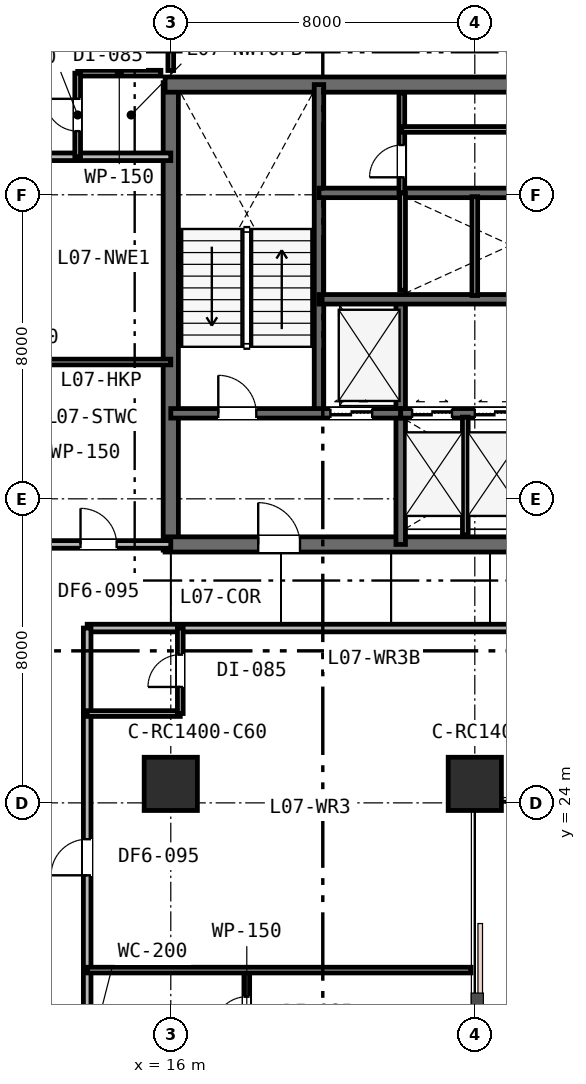
"""IFC4 building model, lengths in metres.
Left out: names, types, materials, properties, quantities, classifications, styles, units other than length and angle.
Written with IfcOpenShell. Run it as: python <this file> out.ifc"""

import sys

from ifc_helpers import new_model, si_unit, direction, frame, frame_2d, origin, origin_2d, place, context, subcontext, project, spatial, rectangle, extrude, element, fill, save


model = new_model("IFC4")
c1 = context("Model", 3, precision=1e-05, world=origin(), true_north=direction((0.0, 1.0)))
c2 = subcontext(c1, "Body", "Model", "MODEL_VIEW")
j1 = project(units=[si_unit("LENGTHUNIT", "METRE"), si_unit("PLANEANGLEUNIT", "RADIAN")], contexts=[c1])
p1 = place(None, origin())
s1 = spatial("IfcSite", under=j1, at=p1, CompositionType="ELEMENT")
p2 = place(p1, origin())
s2 = spatial("IfcBuilding", under=s1, at=p2, CompositionType="ELEMENT")
p3 = place(p2, frame((0.0, 0.0, 33.0)))
s3 = spatial("IfcBuildingStorey", under=s2, at=p3, CompositionType="ELEMENT", Elevation=33.0)
p4 = place(p3, frame((16.0, 30.65, 0.0), z_axis=(0.0, 0.0, 1.0), x_axis=(0.0, 1.0, 0.0)))
e1 = element("IfcWall", 1, at=p4, inside=s3, PredefinedType="SHEAR", context=c2, shape_type="SweptSolid", body=[
    extrude(rectangle(XDim=12.3, YDim=0.4, at=frame_2d((6.15, 0.0))), origin(), (0.0, 0.0, 1.0), 3.6),
])
p5 = place(p3, frame((15.85, 42.9, 0.0), z_axis=(0.0, 0.0, 1.0), x_axis=(1.0, 0.0, 0.0)))
e2 = element("IfcWall", 2, at=p5, inside=s3, PredefinedType="SHEAR", context=c2, shape_type="SweptSolid", body=[
    extrude(rectangle(XDim=24.3, YDim=0.4, at=frame_2d((12.15, 0.0))), origin(), (0.0, 0.0, 1.0), 3.6),
])
p6 = place(p3, frame((15.85, 30.8, 0.0), z_axis=(0.0, 0.0, 1.0), x_axis=(1.0, 0.0, 0.0)))
e3 = element("IfcWall", 3, at=p6, inside=s3, PredefinedType="SHEAR", context=c2, shape_type="SweptSolid", body=[
    extrude(rectangle(XDim=11.2, YDim=0.4, at=frame_2d((5.6, 0.0))), origin(), (0.0, 0.0, 1.0), 3.6),
])
p7 = place(p6, frame((2.45, 0.0, 0.0)))
e4 = element("IfcOpeningElement", 4, at=p7, cuts=e3, PredefinedType="OPENING", context=c2, shape_type="SweptSolid", body=[
    extrude(rectangle(XDim=1.1, YDim=2.15, at=frame_2d((0.55, 1.075))), frame((0.0, 0.21, 0.0), z_axis=(0.0, -1.0, 0.0), x_axis=(1.0, 0.0, 0.0)), (0.0, 0.0, 1.0), 0.42),
])
p8 = place(p3, frame((19.9, 34.25, 0.0), z_axis=(0.0, 0.0, 1.0), x_axis=(0.0, 1.0, 0.0)))
e5 = element("IfcWall", 5, at=p8, inside=s3, PredefinedType="SHEAR", context=c2, shape_type="SweptSolid", body=[
    extrude(rectangle(XDim=8.65, YDim=0.25, at=frame_2d((4.325, 0.0))), origin(), (0.0, 0.0, 1.0), 3.6),
])
p9 = place(p3, frame((22.05, 30.8, 0.0), z_axis=(0.0, 0.0, 1.0), x_axis=(0.0, 1.0, 0.0)))
e6 = element("IfcWall", 6, at=p9, inside=s3, PredefinedType="SHEAR", context=c2, shape_type="SweptSolid", body=[
    extrude(rectangle(XDim=6.45, YDim=0.25, at=frame_2d((3.225, 0.0))), origin(), (0.0, 0.0, 1.0), 3.6),
])
p10 = place(p3, frame((16.0, 34.25, 0.0), z_axis=(0.0, 0.0, 1.0), x_axis=(1.0, 0.0, 0.0)))
e7 = element("IfcWall", 7, at=p10, inside=s3, PredefinedType="SHEAR", context=c2, shape_type="SweptSolid", body=[
    extrude(rectangle(XDim=6.05, YDim=0.25, at=frame_2d((3.025, 0.0))), origin(), (0.0, 0.0, 1.0), 3.6),
])
p11 = place(p10, frame((1.25, 0.0, 0.0)))
e8 = element("IfcOpeningElement", 8, at=p11, cuts=e7, PredefinedType="OPENING", context=c2, shape_type="SweptSolid", body=[
    extrude(rectangle(XDim=1.0, YDim=2.15, at=frame_2d((0.5, 1.075))), frame((0.0, 0.135, 0.0), z_axis=(0.0, -1.0, 0.0), x_axis=(1.0, 0.0, 0.0)), (0.0, 0.0, 1.0), 0.27),
])
p12 = place(p10, frame((4.2, 0.0, 0.0)))
e9 = element("IfcOpeningElement", 9, at=p12, cuts=e7, PredefinedType="OPENING", context=c2, shape_type="SweptSolid", body=[
    extrude(rectangle(XDim=1.1, YDim=2.15, at=frame_2d((0.55, 1.075))), frame((0.0, 0.135, 0.0), z_axis=(0.0, -1.0, 0.0), x_axis=(1.0, 0.0, 0.0)), (0.0, 0.0, 1.0), 0.27),
])
p13 = place(p3, frame((22.05, 34.25, 0.0), z_axis=(0.0, 0.0, 1.0), x_axis=(1.0, 0.0, 0.0)))
e10 = element("IfcWall", 10, at=p13, inside=s3, PredefinedType="SHEAR", context=c2, shape_type="SweptSolid", body=[
    extrude(rectangle(XDim=5.0, YDim=0.25, at=frame_2d((2.5, 0.0))), origin(), (0.0, 0.0, 1.0), 3.6),
])
p14 = place(p13, frame((0.3, 0.0, 0.0)))
e11 = element("IfcOpeningElement", 11, at=p14, cuts=e10, PredefinedType="OPENING", context=c2, shape_type="SweptSolid", body=[
    extrude(rectangle(XDim=1.05, YDim=2.15, at=frame_2d((0.525, 1.075))), frame((0.0, 0.135, 0.0), z_axis=(0.0, -1.0, 0.0), x_axis=(1.0, 0.0, 0.0)), (0.0, 0.0, 1.0), 0.27),
])
p15 = place(p13, frame((1.95, 0.0, 0.0)))
e12 = element("IfcOpeningElement", 12, at=p15, cuts=e10, PredefinedType="OPENING", context=c2, shape_type="SweptSolid", body=[
    extrude(rectangle(XDim=1.05, YDim=2.15, at=frame_2d((0.525, 1.075))), frame((0.0, 0.135, 0.0), z_axis=(0.0, -1.0, 0.0), x_axis=(1.0, 0.0, 0.0)), (0.0, 0.0, 1.0), 0.27),
])
p16 = place(p13, frame((3.6, 0.0, 0.0)))
e13 = element("IfcOpeningElement", 13, at=p16, cuts=e10, PredefinedType="OPENING", context=c2, shape_type="SweptSolid", body=[
    extrude(rectangle(XDim=1.05, YDim=2.15, at=frame_2d((0.525, 1.075))), frame((0.0, 0.135, 0.0), z_axis=(0.0, -1.0, 0.0), x_axis=(1.0, 0.0, 0.0)), (0.0, 0.0, 1.0), 0.27),
])
p17 = place(p3, frame((19.9, 37.25, 0.0), z_axis=(0.0, 0.0, 1.0), x_axis=(1.0, 0.0, 0.0)))
e14 = element("IfcWall", 14, at=p17, inside=s3, PredefinedType="SHEAR", context=c2, shape_type="SweptSolid", body=[
    extrude(rectangle(XDim=16.2, YDim=0.25, at=frame_2d((8.1, 0.0))), origin(), (0.0, 0.0, 1.0), 3.6),
])
p18 = place(p17, frame((12.55, 0.0, 0.0)))
e15 = element("IfcOpeningElement", 15, at=p18, cuts=e14, PredefinedType="OPENING", context=c2, shape_type="SweptSolid", body=[
    extrude(rectangle(XDim=0.9, YDim=2.15, at=frame_2d((0.45, 1.075))), frame((0.0, 0.135, 0.0), z_axis=(0.0, -1.0, 0.0), x_axis=(1.0, 0.0, 0.0)), (0.0, 0.0, 1.0), 0.27),
])
p19 = place(p3, frame((19.9, 40.05, 0.0), z_axis=(0.0, 0.0, 1.0), x_axis=(1.0, 0.0, 0.0)))
e16 = element("IfcWall", 16, at=p19, inside=s3, PredefinedType="SHEAR", context=c2, shape_type="SweptSolid", body=[
    extrude(rectangle(XDim=12.05, YDim=0.25, at=frame_2d((6.025, 0.0))), origin(), (0.0, 0.0, 1.0), 3.6),
])
for number, where, z_axis, x_axis in (
    (17, (16.0, 24.5, 0.0), (0.0, 0.0, 1.0), (1.0, 0.0, 0.0)),
    (18, (24.0, 24.5, 0.0), (0.0, 0.0, 1.0), (1.0, 0.0, 0.0)),
):
    element("IfcColumn", number, at=place(p3, frame(where, z_axis=z_axis, x_axis=x_axis)), inside=s3, PredefinedType="COLUMN", context=c2, shape_type="SweptSolid", body=[
        extrude(rectangle(XDim=1.4, YDim=1.4, at=origin_2d()), origin(), (0.0, 0.0, 1.0), 3.6),
    ])
p20 = place(p3, frame((23.75, 31.05, 0.0), z_axis=(0.0, 0.0, 1.0), x_axis=(0.0, 1.0, 0.0)))
e19 = element("IfcWall", 19, at=p20, inside=s3, PredefinedType="PLUMBINGWALL", context=c2, shape_type="SweptSolid", body=[
    extrude(rectangle(XDim=3.1, YDim=0.15, at=frame_2d((1.55, 0.0))), origin(), (0.0, 0.0, 1.0), 3.33),
])
p21 = place(p3, frame((22.1, 37.49, 0.0), z_axis=(0.0, 0.0, 1.0), x_axis=(0.0, 1.0, 0.0)))
e20 = element("IfcWall", 20, at=p21, inside=s3, PredefinedType="PLUMBINGWALL", context=c2, shape_type="SweptSolid", body=[
    extrude(rectangle(XDim=2.56, YDim=0.15, at=frame_2d((1.28, 0.0))), origin(), (0.0, 0.0, 1.0), 3.33),
])
p22 = place(p3, frame((24.0, 37.35, 0.0), z_axis=(0.0, 0.0, 1.0), x_axis=(0.0, 1.0, 0.0)))
e21 = element("IfcWall", 21, at=p22, inside=s3, PredefinedType="PLUMBINGWALL", context=c2, shape_type="SweptSolid", body=[
    extrude(rectangle(XDim=2.6, YDim=0.15, at=frame_2d((1.3, 0.0))), origin(), (0.0, 0.0, 1.0), 3.33),
])
p23 = place(p3, frame((22.08, 40.05, 0.0), z_axis=(0.0, 0.0, 1.0), x_axis=(0.0, 1.0, 0.0)))
e22 = element("IfcWall", 22, at=p23, inside=s3, PredefinedType="PARTITIONING", context=c2, shape_type="SweptSolid", body=[
    extrude(rectangle(XDim=2.63, YDim=0.15, at=frame_2d((1.315, 0.0))), origin(), (0.0, 0.0, 1.0), 3.33),
])
p24 = place(p23, frame((0.41, 0.0, 0.0)))
e23 = element("IfcOpeningElement", 23, at=p24, cuts=e22, PredefinedType="OPENING", context=c2, shape_type="SweptSolid", body=[
    extrude(rectangle(XDim=0.85, YDim=2.15, at=frame_2d((0.425, 1.075))), frame((0.0, 0.085, 0.0), z_axis=(0.0, -1.0, 0.0), x_axis=(1.0, 0.0, 0.0)), (0.0, 0.0, 1.0), 0.17),
])
p25 = place(p3, frame((22.08, 41.72, 0.0), z_axis=(0.0, 0.0, 1.0), x_axis=(1.0, 0.0, 0.0)))
e24 = element("IfcWall", 24, at=p25, inside=s3, PredefinedType="PARTITIONING", context=c2, shape_type="SweptSolid", body=[
    extrude(rectangle(XDim=11.97, YDim=0.15, at=frame_2d((5.985, 0.0))), origin(), (0.0, 0.0, 1.0), 3.33),
])
p26 = place(p25, frame((5.535, 0.0, 0.0)))
e25 = element("IfcOpeningElement", 25, at=p26, cuts=e24, PredefinedType="OPENING", context=c2, shape_type="SweptSolid", body=[
    extrude(rectangle(XDim=0.9, YDim=2.15, at=frame_2d((0.45, 1.075))), frame((0.0, 0.085, 0.0), z_axis=(0.0, -1.0, 0.0), x_axis=(1.0, 0.0, 0.0)), (0.0, 0.0, 1.0), 0.17),
])
p27 = place(p3, frame((13.8, 28.6, 0.0), z_axis=(0.0, 0.0, 1.0), x_axis=(1.0, 0.0, 0.0)))
e26 = element("IfcWall", 26, at=p27, inside=s3, PredefinedType="PARTITIONING", context=c2, shape_type="SweptSolid", body=[
    extrude(rectangle(XDim=36.6, YDim=0.2, at=frame_2d((18.3, 0.0))), origin(), (0.0, 0.0, 1.0), 2.68),
])
p28 = place(p27, frame((12.3, 0.0, 0.0)))
e27 = element("IfcOpeningElement", 27, at=p28, cuts=e26, PredefinedType="OPENING", context=c2, shape_type="SweptSolid", body=[
    extrude(rectangle(XDim=0.95, YDim=2.15, at=frame_2d((0.475, 1.075))), frame((0.0, 0.11, 0.0), z_axis=(0.0, -1.0, 0.0), x_axis=(1.0, 0.0, 0.0)), (0.0, 0.0, 1.0), 0.22),
])
p29 = place(p27, frame((20.075, 0.0, 0.0)))
e28 = element("IfcOpeningElement", 28, at=p29, cuts=e26, PredefinedType="OPENING", context=c2, shape_type="SweptSolid", body=[
    extrude(rectangle(XDim=0.95, YDim=2.15, at=frame_2d((0.475, 1.075))), frame((0.0, 0.11, 0.0), z_axis=(0.0, -1.0, 0.0), x_axis=(1.0, 0.0, 0.0)), (0.0, 0.0, 1.0), 0.22),
])
p30 = place(p27, frame((26.829, 0.0, 0.0)))
e29 = element("IfcOpeningElement", 29, at=p30, cuts=e26, PredefinedType="OPENING", context=c2, shape_type="SweptSolid", body=[
    extrude(rectangle(XDim=0.95, YDim=2.15, at=frame_2d((0.475, 1.075))), frame((0.0, 0.11, 0.0), z_axis=(0.0, -1.0, 0.0), x_axis=(1.0, 0.0, 0.0)), (0.0, 0.0, 1.0), 0.22),
])
p31 = place(p27, frame((32.669, 0.0, 0.0)))
e30 = element("IfcOpeningElement", 30, at=p31, cuts=e26, PredefinedType="OPENING", context=c2, shape_type="SweptSolid", body=[
    extrude(rectangle(XDim=0.95, YDim=2.15, at=frame_2d((0.475, 1.075))), frame((0.0, 0.11, 0.0), z_axis=(0.0, -1.0, 0.0), x_axis=(1.0, 0.0, 0.0)), (0.0, 0.0, 1.0), 0.22),
])
p32 = place(p3, frame((8.3, 35.6, 0.0), z_axis=(0.0, 0.0, 1.0), x_axis=(1.0, 0.0, 0.0)))
e31 = element("IfcWall", 31, at=p32, inside=s3, PredefinedType="PARTITIONING", context=c2, shape_type="SweptSolid", body=[
    extrude(rectangle(XDim=7.7, YDim=0.15, at=frame_2d((3.85, 0.0))), origin(), (0.0, 0.0, 1.0), 2.68),
])
p33 = place(p3, frame((8.3, 30.8, 0.0), z_axis=(0.0, 0.0, 1.0), x_axis=(1.0, 0.0, 0.0)))
e32 = element("IfcWall", 32, at=p33, inside=s3, PredefinedType="PARTITIONING", context=c2, shape_type="SweptSolid", body=[
    extrude(rectangle(XDim=7.7, YDim=0.2, at=frame_2d((3.85, 0.0))), origin(), (0.0, 0.0, 1.0), 2.68),
])
p34 = place(p33, frame((5.325, 0.0, 0.0)))
e33 = element("IfcOpeningElement", 33, at=p34, cuts=e32, PredefinedType="OPENING", context=c2, shape_type="SweptSolid", body=[
    extrude(rectangle(XDim=0.95, YDim=2.15, at=frame_2d((0.475, 1.075))), frame((0.0, 0.11, 0.0), z_axis=(0.0, -1.0, 0.0), x_axis=(1.0, 0.0, 0.0)), (0.0, 0.0, 1.0), 0.22),
])
p35 = place(p3, frame((0.1, 41.0, 0.0), z_axis=(0.0, 0.0, 1.0), x_axis=(1.0, 0.0, 0.0)))
e34 = element("IfcWall", 34, at=p35, inside=s3, PredefinedType="PARTITIONING", context=c2, shape_type="SweptSolid", body=[
    extrude(rectangle(XDim=15.9, YDim=0.2, at=frame_2d((7.95, 0.0))), origin(), (0.0, 0.0, 1.0), 2.68),
])
p36 = place(p35, frame((6.779, 0.0, 0.0)))
e35 = element("IfcOpeningElement", 35, at=p36, cuts=e34, PredefinedType="OPENING", context=c2, shape_type="SweptSolid", body=[
    extrude(rectangle(XDim=0.95, YDim=2.15, at=frame_2d((0.475, 1.075))), frame((0.0, 0.11, 0.0), z_axis=(0.0, -1.0, 0.0), x_axis=(1.0, 0.0, 0.0)), (0.0, 0.0, 1.0), 0.22),
])
p37 = place(p3, frame((13.55, 43.2, 0.0), z_axis=(0.0, 0.0, 1.0), x_axis=(1.0, 0.0, 0.0)))
e36 = element("IfcWall", 36, at=p37, inside=s3, PredefinedType="PARTITIONING", context=c2, shape_type="SweptSolid", body=[
    extrude(rectangle(XDim=2.19, YDim=0.15, at=frame_2d((1.095, 0.0))), origin(), (0.0, 0.0, 1.0), 3.33),
])
p38 = place(p3, frame((13.55, 41.0, 0.0), z_axis=(0.0, 0.0, 1.0), x_axis=(0.0, 1.0, 0.0)))
e37 = element("IfcWall", 37, at=p38, inside=s3, PredefinedType="PARTITIONING", context=c2, shape_type="SweptSolid", body=[
    extrude(rectangle(XDim=2.2, YDim=0.15, at=frame_2d((1.1, 0.0))), origin(), (0.0, 0.0, 1.0), 3.33),
])
p39 = place(p38, frame((0.675, 0.0, 0.0)))
e38 = element("IfcOpeningElement", 38, at=p39, cuts=e37, PredefinedType="OPENING", context=c2, shape_type="SweptSolid", body=[
    extrude(rectangle(XDim=0.85, YDim=2.15, at=frame_2d((0.425, 1.075))), frame((0.0, 0.085, 0.0), z_axis=(0.0, -1.0, 0.0), x_axis=(1.0, 0.0, 0.0)), (0.0, 0.0, 1.0), 0.17),
])
p40 = place(p3, frame((16.0, 43.27, 0.0), z_axis=(0.0, 0.0, 1.0), x_axis=(0.0, 1.0, 0.0)))
e39 = element("IfcWall", 39, at=p40, inside=s3, PredefinedType="PARTITIONING", context=c2, shape_type="SweptSolid", body=[
    extrude(rectangle(XDim=4.63, YDim=0.15, at=frame_2d((2.315, 0.0))), origin(), (0.0, 0.0, 1.0), 2.87),
])
p41 = place(p3, frame((13.8, 5.6, 0.0), z_axis=(0.0, 0.0, 1.0), x_axis=(0.0, 1.0, 0.0)))
e40 = element("IfcWall", 40, at=p41, inside=s3, PredefinedType="PARTITIONING", context=c2, shape_type="SweptSolid", body=[
    extrude(rectangle(XDim=23.0, YDim=0.2, at=frame_2d((11.5, 0.0))), origin(), (0.0, 0.0, 1.0), 2.68),
])
p42 = place(p41, frame((0.752, 0.0, 0.0)))
e41 = element("IfcOpeningElement", 41, at=p42, cuts=e40, PredefinedType="OPENING", context=c2, shape_type="SweptSolid", body=[
    extrude(rectangle(XDim=0.95, YDim=2.15, at=frame_2d((0.475, 1.075))), frame((0.0, 0.11, 0.0), z_axis=(0.0, -1.0, 0.0), x_axis=(1.0, 0.0, 0.0)), (0.0, 0.0, 1.0), 0.22),
])
p43 = place(p41, frame((9.29, 0.0, 0.0)))
e42 = element("IfcOpeningElement", 42, at=p43, cuts=e40, PredefinedType="OPENING", context=c2, shape_type="SweptSolid", body=[
    extrude(rectangle(XDim=0.95, YDim=2.15, at=frame_2d((0.475, 1.075))), frame((0.0, 0.11, 0.0), z_axis=(0.0, -1.0, 0.0), x_axis=(1.0, 0.0, 0.0)), (0.0, 0.0, 1.0), 0.22),
])
p44 = place(p41, frame((16.494, 0.0, 0.0)))
e43 = element("IfcOpeningElement", 43, at=p44, cuts=e40, PredefinedType="OPENING", context=c2, shape_type="SweptSolid", body=[
    extrude(rectangle(XDim=0.95, YDim=2.15, at=frame_2d((0.475, 1.075))), frame((0.0, 0.11, 0.0), z_axis=(0.0, -1.0, 0.0), x_axis=(1.0, 0.0, 0.0)), (0.0, 0.0, 1.0), 0.22),
])
p45 = place(p3, frame((18.0, 17.35, 0.0), z_axis=(0.0, 0.0, 1.0), x_axis=(0.0, 1.0, 0.0)))
e44 = element("IfcWall", 44, at=p45, inside=s3, PredefinedType="PARTITIONING", context=c2, shape_type="SweptSolid", body=[
    extrude(rectangle(XDim=2.25, YDim=0.15, at=frame_2d((1.125, 0.0))), origin(), (0.0, 0.0, 1.0), 2.68),
])
p46 = place(p45, frame((0.7, 0.0, 0.0)))
e45 = element("IfcOpeningElement", 45, at=p46, cuts=e44, PredefinedType="OPENING", context=c2, shape_type="SweptSolid", body=[
    extrude(rectangle(XDim=0.85, YDim=2.15, at=frame_2d((0.425, 1.075))), frame((0.0, 0.085, 0.0), z_axis=(0.0, -1.0, 0.0), x_axis=(1.0, 0.0, 0.0)), (0.0, 0.0, 1.0), 0.17),
])
p47 = place(p3, frame((13.8, 19.6, 0.0), z_axis=(0.0, 0.0, 1.0), x_axis=(1.0, 0.0, 0.0)))
e46 = element("IfcWall", 46, at=p47, inside=s3, PredefinedType="PARTITIONING", context=c2, shape_type="SweptSolid", body=[
    extrude(rectangle(XDim=10.1, YDim=0.15, at=frame_2d((5.05, 0.0))), origin(), (0.0, 0.0, 1.0), 2.68),
])
p48 = place(p3, frame((13.8, 26.35, 0.0), z_axis=(0.0, 0.0, 1.0), x_axis=(1.0, 0.0, 0.0)))
e47 = element("IfcWall", 47, at=p48, inside=s3, PredefinedType="PARTITIONING", context=c2, shape_type="SweptSolid", body=[
    extrude(rectangle(XDim=2.45, YDim=0.15, at=frame_2d((1.225, 0.0))), origin(), (0.0, 0.0, 1.0), 2.68),
])
p49 = place(p3, frame((16.25, 26.35, 0.0), z_axis=(0.0, 0.0, 1.0), x_axis=(0.0, 1.0, 0.0)))
e48 = element("IfcWall", 48, at=p49, inside=s3, PredefinedType="PARTITIONING", context=c2, shape_type="SweptSolid", body=[
    extrude(rectangle(XDim=2.25, YDim=0.15, at=frame_2d((1.125, 0.0))), origin(), (0.0, 0.0, 1.0), 2.68),
])
p50 = place(p49, frame((0.7, 0.0, 0.0)))
e49 = element("IfcOpeningElement", 49, at=p50, cuts=e48, PredefinedType="OPENING", context=c2, shape_type="SweptSolid", body=[
    extrude(rectangle(XDim=0.85, YDim=2.15, at=frame_2d((0.425, 1.075))), frame((0.0, 0.085, 0.0), z_axis=(0.0, -1.0, 0.0), x_axis=(1.0, 0.0, 0.0)), (0.0, 0.0, 1.0), 0.17),
])
p51 = place(p11, origin())
e50 = element("IfcDoor", 50, at=p51, inside=s3, OperationType="SINGLE_SWING_LEFT", PredefinedType="DOOR", context=c2, shape_type="SweptSolid", body=[
    extrude(rectangle(XDim=1.0, YDim=2.15, at=frame_2d((0.5, 1.075))), frame((0.0, 0.025, 0.0), z_axis=(0.0, -1.0, 0.0), x_axis=(1.0, 0.0, 0.0)), (0.0, 0.0, 1.0), 0.05),
])
fill(e8, e50)
p52 = place(p7, origin())
e51 = element("IfcDoor", 51, at=p52, inside=s3, OperationType="SINGLE_SWING_LEFT", PredefinedType="DOOR", context=c2, shape_type="SweptSolid", body=[
    extrude(rectangle(XDim=1.1, YDim=2.15, at=frame_2d((0.55, 1.075))), frame((0.0, 0.025, 0.0), z_axis=(0.0, -1.0, 0.0), x_axis=(1.0, 0.0, 0.0)), (0.0, 0.0, 1.0), 0.05),
])
fill(e4, e51)
p53 = place(p24, origin())
e52 = element("IfcDoor", 52, at=p53, inside=s3, OperationType="SINGLE_SWING_LEFT", PredefinedType="DOOR", context=c2, shape_type="SweptSolid", body=[
    extrude(rectangle(XDim=0.85, YDim=2.15, at=frame_2d((0.425, 1.075))), frame((0.0, 0.025, 0.0), z_axis=(0.0, -1.0, 0.0), x_axis=(1.0, 0.0, 0.0)), (0.0, 0.0, 1.0), 0.05),
])
fill(e23, e52)
p54 = place(p34, origin())
e53 = element("IfcDoor", 53, at=p54, inside=s3, OperationType="SINGLE_SWING_LEFT", PredefinedType="DOOR", context=c2, shape_type="SweptSolid", body=[
    extrude(rectangle(XDim=0.95, YDim=2.15, at=frame_2d((0.475, 1.075))), frame((0.0, 0.025, 0.0), z_axis=(0.0, -1.0, 0.0), x_axis=(1.0, 0.0, 0.0)), (0.0, 0.0, 1.0), 0.05),
])
fill(e33, e53)
p55 = place(p39, origin())
e54 = element("IfcDoor", 54, at=p55, inside=s3, OperationType="SINGLE_SWING_RIGHT", PredefinedType="DOOR", context=c2, shape_type="SweptSolid", body=[
    extrude(rectangle(XDim=0.85, YDim=2.15, at=frame_2d((0.425, 1.075))), frame((0.0, 0.025, 0.0), z_axis=(0.0, -1.0, 0.0), x_axis=(1.0, 0.0, 0.0)), (0.0, 0.0, 1.0), 0.05),
])
fill(e38, e54)
p56 = place(p46, origin())
e55 = element("IfcDoor", 55, at=p56, inside=s3, OperationType="SINGLE_SWING_LEFT", PredefinedType="DOOR", context=c2, shape_type="SweptSolid", body=[
    extrude(rectangle(XDim=0.85, YDim=2.15, at=frame_2d((0.425, 1.075))), frame((0.0, 0.025, 0.0), z_axis=(0.0, -1.0, 0.0), x_axis=(1.0, 0.0, 0.0)), (0.0, 0.0, 1.0), 0.05),
])
fill(e45, e55)
p57 = place(p44, origin())
e56 = element("IfcDoor", 56, at=p57, inside=s3, OperationType="SINGLE_SWING_LEFT", PredefinedType="DOOR", context=c2, shape_type="SweptSolid", body=[
    extrude(rectangle(XDim=0.95, YDim=2.15, at=frame_2d((0.475, 1.075))), frame((0.0, 0.025, 0.0), z_axis=(0.0, -1.0, 0.0), x_axis=(1.0, 0.0, 0.0)), (0.0, 0.0, 1.0), 0.05),
])
fill(e43, e56)
p58 = place(p50, origin())
e57 = element("IfcDoor", 57, at=p58, inside=s3, OperationType="SINGLE_SWING_LEFT", PredefinedType="DOOR", context=c2, shape_type="SweptSolid", body=[
    extrude(rectangle(XDim=0.85, YDim=2.15, at=frame_2d((0.425, 1.075))), frame((0.0, 0.025, 0.0), z_axis=(0.0, -1.0, 0.0), x_axis=(1.0, 0.0, 0.0)), (0.0, 0.0, 1.0), 0.05),
])
fill(e49, e57)
p59 = place(p12, origin())
e58 = element("IfcDoor", 58, at=p59, inside=s3, OperationType="DOUBLE_DOOR_SLIDING", PredefinedType="DOOR", context=c2, shape_type="SweptSolid", body=[
    extrude(rectangle(XDim=1.1, YDim=2.15, at=frame_2d((0.55, 1.075))), frame((0.0, 0.025, 0.0), z_axis=(0.0, -1.0, 0.0), x_axis=(1.0, 0.0, 0.0)), (0.0, 0.0, 1.0), 0.05),
])
fill(e9, e58)
p60 = place(p14, origin())
e59 = element("IfcDoor", 59, at=p60, inside=s3, OperationType="DOUBLE_DOOR_SLIDING", PredefinedType="DOOR", context=c2, shape_type="SweptSolid", body=[
    extrude(rectangle(XDim=1.05, YDim=2.15, at=frame_2d((0.525, 1.075))), frame((0.0, 0.025, 0.0), z_axis=(0.0, -1.0, 0.0), x_axis=(1.0, 0.0, 0.0)), (0.0, 0.0, 1.0), 0.05),
])
fill(e11, e59)
p61 = place(p15, origin())
e60 = element("IfcDoor", 60, at=p61, inside=s3, OperationType="DOUBLE_DOOR_SLIDING", PredefinedType="DOOR", context=c2, shape_type="SweptSolid", body=[
    extrude(rectangle(XDim=1.05, YDim=2.15, at=frame_2d((0.525, 1.075))), frame((0.0, 0.025, 0.0), z_axis=(0.0, -1.0, 0.0), x_axis=(1.0, 0.0, 0.0)), (0.0, 0.0, 1.0), 0.05),
])
fill(e12, e60)
save(model, sys.argv[1])
